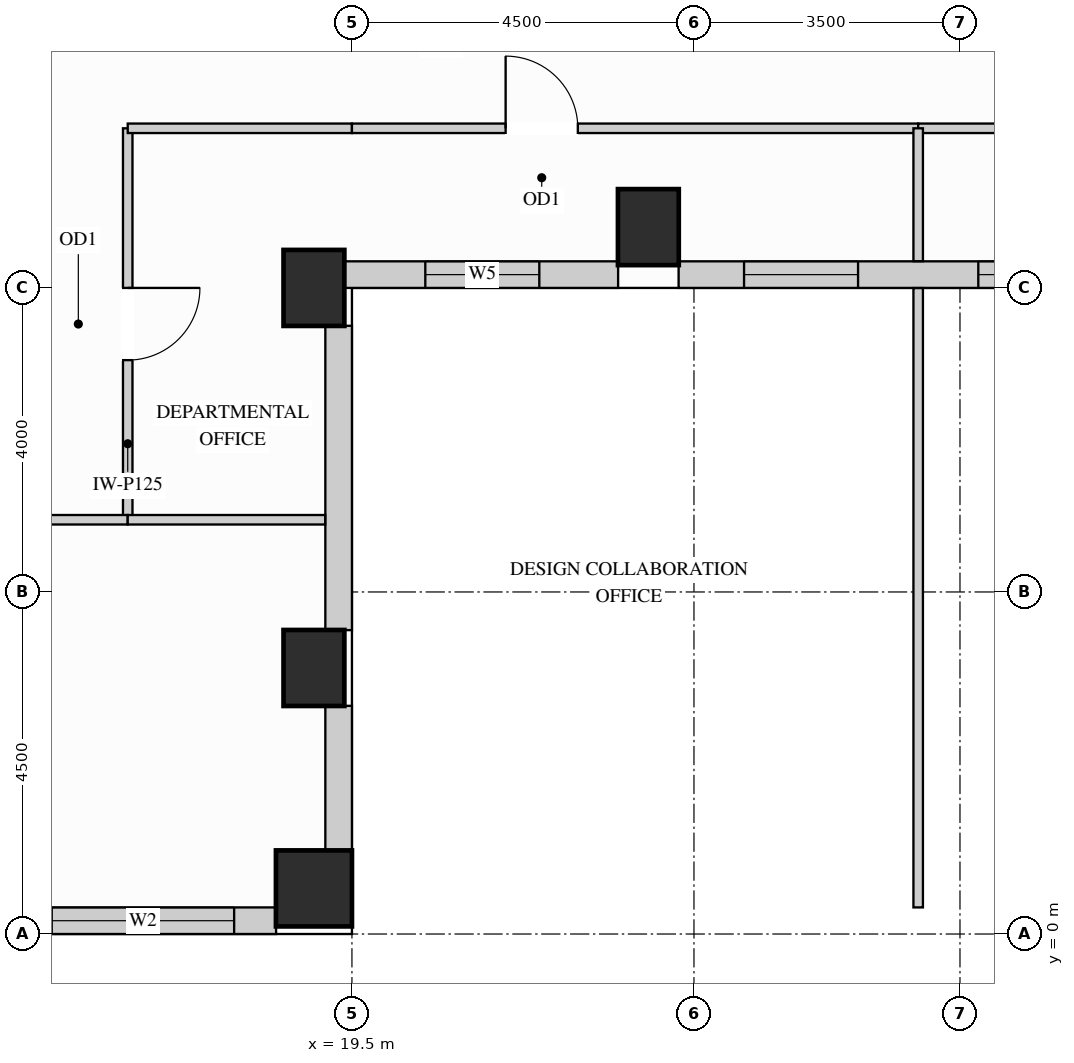
"""IFC4 building model, lengths in metres.
Left out: names, types, materials, properties, quantities, classifications, styles, units other than length and angle.
Written with IfcOpenShell. Run it as: python <this file> out.ifc"""

import sys

from ifc_helpers import new_model, si_unit, direction, frame, frame_2d, origin, origin_2d, place, context, subcontext, project, spatial, rectangle, extrude, source, transform, mapped, element, fill, save


model = new_model("IFC4")
c1 = context("Model", 3, precision=1e-05, world=origin(), true_north=direction((0.0, 1.0)))
c2 = subcontext(c1, "Body", "Model", "MODEL_VIEW")
j1 = project(units=[si_unit("LENGTHUNIT", "METRE"), si_unit("PLANEANGLEUNIT", "RADIAN")], contexts=[c1])
p1 = place(None, origin())
s1 = spatial("IfcSite", under=j1, at=p1, CompositionType="ELEMENT")
p2 = place(p1, origin())
s2 = spatial("IfcBuilding", under=s1, at=p2, CompositionType="ELEMENT")
p3 = place(p2, frame((0.0, 0.0, 197.1)))
s3 = spatial("IfcBuildingStorey", under=s2, at=p3, CompositionType="ELEMENT", Elevation=197.1)
m1 = source(origin(), c2, "Body", "SweptSolid", [
    extrude(rectangle(XDim=0.8, YDim=1.0, at=origin_2d()), origin(), (0.0, 0.0, 1.0), 3.4),
])
for number, where, z_axis, x_axis in (
    (1, (19.0, 3.5, 0.0), (0.0, 0.0, 1.0), (1.0, 0.0, 0.0)),
    (2, (19.0, 8.5, 0.0), (0.0, 0.0, 1.0), (1.0, 0.0, 0.0)),
    (3, (23.4, 9.3, 0.0), (0.0, 0.0, 1.0), (1.0, 0.0, 0.0)),
):
    element("IfcColumn", number, at=place(p3, frame(where, z_axis=z_axis, x_axis=x_axis)), inside=s3, PredefinedType="COLUMN", context=c2, shape_type="MappedRepresentation", body=[
        mapped(m1, transform((0.0, 0.0, 0.0), x_axis=(1.0, 0.0, 0.0), y_axis=(0.0, 1.0, 0.0), z_axis=(0.0, 0.0, 1.0))),
    ])
m2 = source(origin(), c2, "Body", "SweptSolid", [
    extrude(rectangle(XDim=1.0, YDim=1.0, at=origin_2d()), origin(), (0.0, 0.0, 1.0), 3.4),
])
p4 = place(p3, frame((19.0, 0.6, 0.0), z_axis=(0.0, 0.0, 1.0), x_axis=(1.0, 0.0, 0.0)))
e4 = element("IfcColumn", 4, at=p4, inside=s3, PredefinedType="COLUMN", context=c2, shape_type="MappedRepresentation", body=[
    mapped(m2, transform((0.0, 0.0, 0.0), x_axis=(1.0, 0.0, 0.0), y_axis=(0.0, 1.0, 0.0), z_axis=(0.0, 0.0, 1.0))),
])
p5 = place(p3, frame((14.998, 0.175, 0.0), z_axis=(0.0, 0.0, 1.0), x_axis=(1.0, 0.0, 0.0)))
e5 = element("IfcWall", 5, at=p5, inside=s3, PredefinedType="SOLIDWALL", context=c2, shape_type="SweptSolid", body=[
    extrude(rectangle(XDim=3.504, YDim=0.35, at=frame_2d((1.752, 0.0))), origin(), (0.0, 0.0, 1.0), 2.612),
])
p6 = place(p5, frame((0.552, 0.0, 0.78)))
e6 = element("IfcOpeningElement", 6, at=p6, cuts=e5, PredefinedType="OPENING", context=c2, shape_type="SweptSolid", body=[
    extrude(rectangle(XDim=2.4, YDim=1.652, at=frame_2d((1.2, 0.826))), frame((0.0, 0.185, 0.0), z_axis=(0.0, -1.0, 0.0), x_axis=(1.0, 0.0, 0.0)), (0.0, 0.0, 1.0), 0.37),
])
m3 = source(origin(), c2, "Body", "SweptSolid", [
    extrude(rectangle(XDim=1.904, YDim=0.35, at=frame_2d((0.952, 0.0))), origin(), (0.0, 0.0, 1.0), 2.612),
])
p7 = place(p3, frame((19.325, 1.098, 0.0), z_axis=(0.0, 0.0, 1.0), x_axis=(0.0, 1.0, 0.0)))
e7 = element("IfcWall", 7, at=p7, inside=s3, PredefinedType="SOLIDWALL", context=c2, shape_type="MappedRepresentation", body=[
    mapped(m3, transform((0.0, 0.0, 0.0), x_axis=(1.0, 0.0, 0.0), y_axis=(0.0, 1.0, 0.0), z_axis=(0.0, 0.0, 1.0))),
])
m4 = source(origin(), c2, "Body", "SweptSolid", [
    extrude(rectangle(XDim=4.004, YDim=0.35, at=frame_2d((2.002, 0.0))), origin(), (0.0, 0.0, 1.0), 2.612),
])
p8 = place(p3, frame((19.325, 3.998, 0.0), z_axis=(0.0, 0.0, 1.0), x_axis=(0.0, 1.0, 0.0)))
e8 = element("IfcWall", 8, at=p8, inside=s3, PredefinedType="SOLIDWALL", context=c2, shape_type="MappedRepresentation", body=[
    mapped(m4, transform((0.0, 0.0, 0.0), x_axis=(1.0, 0.0, 0.0), y_axis=(0.0, 1.0, 0.0), z_axis=(0.0, 0.0, 1.0))),
])
p9 = place(p3, frame((19.398, 8.675, 0.0), z_axis=(0.0, 0.0, 1.0), x_axis=(1.0, 0.0, 0.0)))
e9 = element("IfcWall", 9, at=p9, inside=s3, PredefinedType="SOLIDWALL", context=c2, shape_type="SweptSolid", body=[
    extrude(rectangle(XDim=3.604, YDim=0.35, at=frame_2d((1.802, 0.0))), origin(), (0.0, 0.0, 1.0), 3.385),
])
p10 = place(p9, frame((1.067, 0.0, 0.78)))
e10 = element("IfcOpeningElement", 10, at=p10, cuts=e9, PredefinedType="OPENING", context=c2, shape_type="SweptSolid", body=[
    extrude(rectangle(XDim=1.5, YDim=2.0, at=frame_2d((0.75, 1.0))), frame((0.0, 0.185, 0.0), z_axis=(0.0, -1.0, 0.0), x_axis=(1.0, 0.0, 0.0)), (0.0, 0.0, 1.0), 0.37),
])
p11 = place(p3, frame((23.798, 8.675, 0.0), z_axis=(0.0, 0.0, 1.0), x_axis=(1.0, 0.0, 0.0)))
e11 = element("IfcWall", 11, at=p11, inside=s3, PredefinedType="SOLIDWALL", context=c2, shape_type="SweptSolid", body=[
    extrude(rectangle(XDim=6.304, YDim=0.35, at=frame_2d((3.152, 0.0))), origin(), (0.0, 0.0, 1.0), 3.385),
])
p12 = place(p11, frame((0.861, 0.0, 0.78)))
e12 = element("IfcOpeningElement", 12, at=p12, cuts=e11, PredefinedType="OPENING", context=c2, shape_type="SweptSolid", body=[
    extrude(rectangle(XDim=1.5, YDim=2.0, at=frame_2d((0.75, 1.0))), frame((0.0, 0.185, 0.0), z_axis=(0.0, -1.0, 0.0), x_axis=(1.0, 0.0, 0.0)), (0.0, 0.0, 1.0), 0.37),
])
p13 = place(p11, frame((3.943, 0.0, 0.78)))
e13 = element("IfcOpeningElement", 13, at=p13, cuts=e11, PredefinedType="OPENING", context=c2, shape_type="SweptSolid", body=[
    extrude(rectangle(XDim=1.5, YDim=2.0, at=frame_2d((0.75, 1.0))), frame((0.0, 0.185, 0.0), z_axis=(0.0, -1.0, 0.0), x_axis=(1.0, 0.0, 0.0)), (0.0, 0.0, 1.0), 0.37),
])
p14 = place(p3, frame((16.55, 5.45, 0.0), z_axis=(0.0, 0.0, 1.0), x_axis=(0.0, 1.0, 0.0)))
e14 = element("IfcWall", 14, at=p14, inside=s3, PredefinedType="PARTITIONING", context=c2, shape_type="SweptSolid", body=[
    extrude(rectangle(XDim=5.15, YDim=0.125, at=frame_2d((2.575, 0.0))), origin(), (0.0, 0.0, 1.0), 3.385),
])
p15 = place(p14, frame((2.1, 0.0, 0.0)))
e15 = element("IfcOpeningElement", 15, at=p15, cuts=e14, PredefinedType="OPENING", context=c2, shape_type="SweptSolid", body=[
    extrude(rectangle(XDim=0.95, YDim=2.15, at=frame_2d((0.475, 1.075))), frame((0.0, 0.073, 0.0), z_axis=(0.0, -1.0, 0.0), x_axis=(1.0, 0.0, 0.0)), (0.0, 0.0, 1.0), 0.145),
])
m5 = source(origin(), c2, "Body", "SweptSolid", [
    extrude(rectangle(XDim=2.95, YDim=0.125, at=frame_2d((1.475, 0.0))), origin(), (0.0, 0.0, 1.0), 3.385),
])
p16 = place(p3, frame((16.55, 10.6, 0.0), z_axis=(0.0, 0.0, 1.0), x_axis=(1.0, 0.0, 0.0)))
e16 = element("IfcWall", 16, at=p16, inside=s3, PredefinedType="PARTITIONING", context=c2, shape_type="MappedRepresentation", body=[
    mapped(m5, transform((0.0, 0.0, 0.0), x_axis=(1.0, 0.0, 0.0), y_axis=(0.0, 1.0, 0.0), z_axis=(0.0, 0.0, 1.0))),
])
p17 = place(p3, frame((19.5, 10.6, 0.0), z_axis=(0.0, 0.0, 1.0), x_axis=(1.0, 0.0, 0.0)))
e17 = element("IfcWall", 17, at=p17, inside=s3, PredefinedType="PARTITIONING", context=c2, shape_type="SweptSolid", body=[
    extrude(rectangle(XDim=7.45, YDim=0.125, at=frame_2d((3.725, 0.0))), origin(), (0.0, 0.0, 1.0), 3.385),
])
p18 = place(p17, frame((2.022, 0.0, 0.0)))
e18 = element("IfcOpeningElement", 18, at=p18, cuts=e17, PredefinedType="OPENING", context=c2, shape_type="SweptSolid", body=[
    extrude(rectangle(XDim=0.95, YDim=2.15, at=frame_2d((0.475, 1.075))), frame((0.0, 0.073, 0.0), z_axis=(0.0, -1.0, 0.0), x_axis=(1.0, 0.0, 0.0)), (0.0, 0.0, 1.0), 0.145),
])
p19 = place(p3, frame((26.95, 10.6, 0.0), z_axis=(0.0, 0.0, 1.0), x_axis=(1.0, 0.0, 0.0)))
e19 = element("IfcWall", 19, at=p19, inside=s3, PredefinedType="PARTITIONING", context=c2, shape_type="SweptSolid", body=[
    extrude(rectangle(XDim=7.45, YDim=0.125, at=frame_2d((3.725, 0.0))), origin(), (0.0, 0.0, 1.0), 3.385),
])
p20 = place(p19, frame((4.478, 0.0, 0.0)))
e20 = element("IfcOpeningElement", 20, at=p20, cuts=e19, PredefinedType="OPENING", context=c2, shape_type="SweptSolid", body=[
    extrude(rectangle(XDim=0.95, YDim=2.15, at=frame_2d((0.475, 1.075))), frame((0.0, 0.073, 0.0), z_axis=(0.0, -1.0, 0.0), x_axis=(1.0, 0.0, 0.0)), (0.0, 0.0, 1.0), 0.145),
])
m6 = source(origin(), c2, "Body", "SweptSolid", [
    extrude(rectangle(XDim=8.148, YDim=0.125, at=frame_2d((4.074, 0.0))), origin(), (0.0, 0.0, 1.0), 3.385),
])
p21 = place(p3, frame((26.95, 0.35, 0.0), z_axis=(0.0, 0.0, 1.0), x_axis=(0.0, 1.0, 0.0)))
e21 = element("IfcWall", 21, at=p21, inside=s3, PredefinedType="PARTITIONING", context=c2, shape_type="MappedRepresentation", body=[
    mapped(m6, transform((0.0, 0.0, 0.0), x_axis=(1.0, 0.0, 0.0), y_axis=(0.0, 1.0, 0.0), z_axis=(0.0, 0.0, 1.0))),
])
m7 = source(origin(), c2, "Body", "SweptSolid", [
    extrude(rectangle(XDim=1.748, YDim=0.125, at=frame_2d((0.874, 0.0))), origin(), (0.0, 0.0, 1.0), 3.385),
])
p22 = place(p3, frame((26.95, 8.852, 0.0), z_axis=(0.0, 0.0, 1.0), x_axis=(0.0, 1.0, 0.0)))
e22 = element("IfcWall", 22, at=p22, inside=s3, PredefinedType="PARTITIONING", context=c2, shape_type="MappedRepresentation", body=[
    mapped(m7, transform((0.0, 0.0, 0.0), x_axis=(1.0, 0.0, 0.0), y_axis=(0.0, 1.0, 0.0), z_axis=(0.0, 0.0, 1.0))),
])
p23 = place(p3, frame((2.45, 5.45, 0.0), z_axis=(0.0, 0.0, 1.0), x_axis=(1.0, 0.0, 0.0)))
e23 = element("IfcWall", 23, at=p23, inside=s3, PredefinedType="PARTITIONING", context=c2, shape_type="SweptSolid", body=[
    extrude(rectangle(XDim=14.1, YDim=0.125, at=frame_2d((7.05, 0.0))), origin(), (0.0, 0.0, 1.0), 3.385),
])
p24 = place(p23, frame((6.575, 0.0, 0.0)))
e24 = element("IfcOpeningElement", 24, at=p24, cuts=e23, PredefinedType="OPENING", context=c2, shape_type="SweptSolid", body=[
    extrude(rectangle(XDim=0.95, YDim=2.15, at=frame_2d((0.475, 1.075))), frame((0.0, 0.073, 0.0), z_axis=(0.0, -1.0, 0.0), x_axis=(1.0, 0.0, 0.0)), (0.0, 0.0, 1.0), 0.145),
])
m8 = source(origin(), c2, "Body", "SweptSolid", [
    extrude(rectangle(XDim=2.598, YDim=0.125, at=frame_2d((1.299, 0.0))), origin(), (0.0, 0.0, 1.0), 3.385),
])
p25 = place(p3, frame((16.55, 5.45, 0.0), z_axis=(0.0, 0.0, 1.0), x_axis=(1.0, 0.0, 0.0)))
e25 = element("IfcWall", 25, at=p25, inside=s3, PredefinedType="PARTITIONING", context=c2, shape_type="MappedRepresentation", body=[
    mapped(m8, transform((0.0, 0.0, 0.0), x_axis=(1.0, 0.0, 0.0), y_axis=(0.0, 1.0, 0.0), z_axis=(0.0, 0.0, 1.0))),
])
m9 = source(origin(), c2, "Body", "SweptSolid", [
    extrude(rectangle(XDim=0.95, YDim=2.15, at=frame_2d((0.475, 1.075))), frame((0.0, 0.025, 0.0), z_axis=(0.0, -1.0, 0.0), x_axis=(1.0, 0.0, 0.0)), (0.0, 0.0, 1.0), 0.05),
])
p26 = place(p15, origin())
e26 = element("IfcDoor", 26, at=p26, inside=s3, OperationType="SINGLE_SWING_RIGHT", PredefinedType="DOOR", context=c2, shape_type="MappedRepresentation", body=[
    mapped(m9, transform((0.0, 0.0, 0.0), x_axis=(1.0, 0.0, 0.0), y_axis=(0.0, 1.0, 0.0), z_axis=(0.0, 0.0, 1.0))),
])
fill(e15, e26)
p27 = place(p18, origin())
e27 = element("IfcDoor", 27, at=p27, inside=s3, OperationType="SINGLE_SWING_LEFT", PredefinedType="DOOR", context=c2, shape_type="MappedRepresentation", body=[
    mapped(m9, transform((0.0, 0.0, 0.0), x_axis=(1.0, 0.0, 0.0), y_axis=(0.0, 1.0, 0.0), z_axis=(0.0, 0.0, 1.0))),
])
fill(e18, e27)
m10 = source(origin(), c2, "Body", "SweptSolid", [
    extrude(rectangle(XDim=2.4, YDim=1.652, at=frame_2d((1.2, 0.826))), frame((0.0, 0.03, 0.0), z_axis=(0.0, -1.0, 0.0), x_axis=(1.0, 0.0, 0.0)), (0.0, 0.0, 1.0), 0.06),
])
p28 = place(p6, origin())
e28 = element("IfcWindow", 28, at=p28, inside=s3, PartitioningType="SINGLE_PANEL", PredefinedType="WINDOW", context=c2, shape_type="MappedRepresentation", body=[
    mapped(m10, transform((0.0, 0.0, 0.0), x_axis=(1.0, 0.0, 0.0), y_axis=(0.0, 1.0, 0.0), z_axis=(0.0, 0.0, 1.0))),
])
fill(e6, e28)
m11 = source(origin(), c2, "Body", "SweptSolid", [
    extrude(rectangle(XDim=1.5, YDim=2.0, at=frame_2d((0.75, 1.0))), frame((0.0, 0.03, 0.0), z_axis=(0.0, -1.0, 0.0), x_axis=(1.0, 0.0, 0.0)), (0.0, 0.0, 1.0), 0.06),
])
p29 = place(p10, origin())
e29 = element("IfcWindow", 29, at=p29, inside=s3, PartitioningType="SINGLE_PANEL", PredefinedType="WINDOW", context=c2, shape_type="MappedRepresentation", body=[
    mapped(m11, transform((0.0, 0.0, 0.0), x_axis=(1.0, 0.0, 0.0), y_axis=(0.0, 1.0, 0.0), z_axis=(0.0, 0.0, 1.0))),
])
fill(e10, e29)
p30 = place(p12, origin())
e30 = element("IfcWindow", 30, at=p30, inside=s3, PartitioningType="SINGLE_PANEL", PredefinedType="WINDOW", context=c2, shape_type="MappedRepresentation", body=[
    mapped(m11, transform((0.0, 0.0, 0.0), x_axis=(1.0, 0.0, 0.0), y_axis=(0.0, 1.0, 0.0), z_axis=(0.0, 0.0, 1.0))),
])
fill(e12, e30)
p31 = place(p13, origin())
e31 = element("IfcWindow", 31, at=p31, inside=s3, PartitioningType="SINGLE_PANEL", PredefinedType="WINDOW", context=c2, shape_type="MappedRepresentation", body=[
    mapped(m11, transform((0.0, 0.0, 0.0), x_axis=(1.0, 0.0, 0.0), y_axis=(0.0, 1.0, 0.0), z_axis=(0.0, 0.0, 1.0))),
])
fill(e13, e31)
save(model, sys.argv[1])
